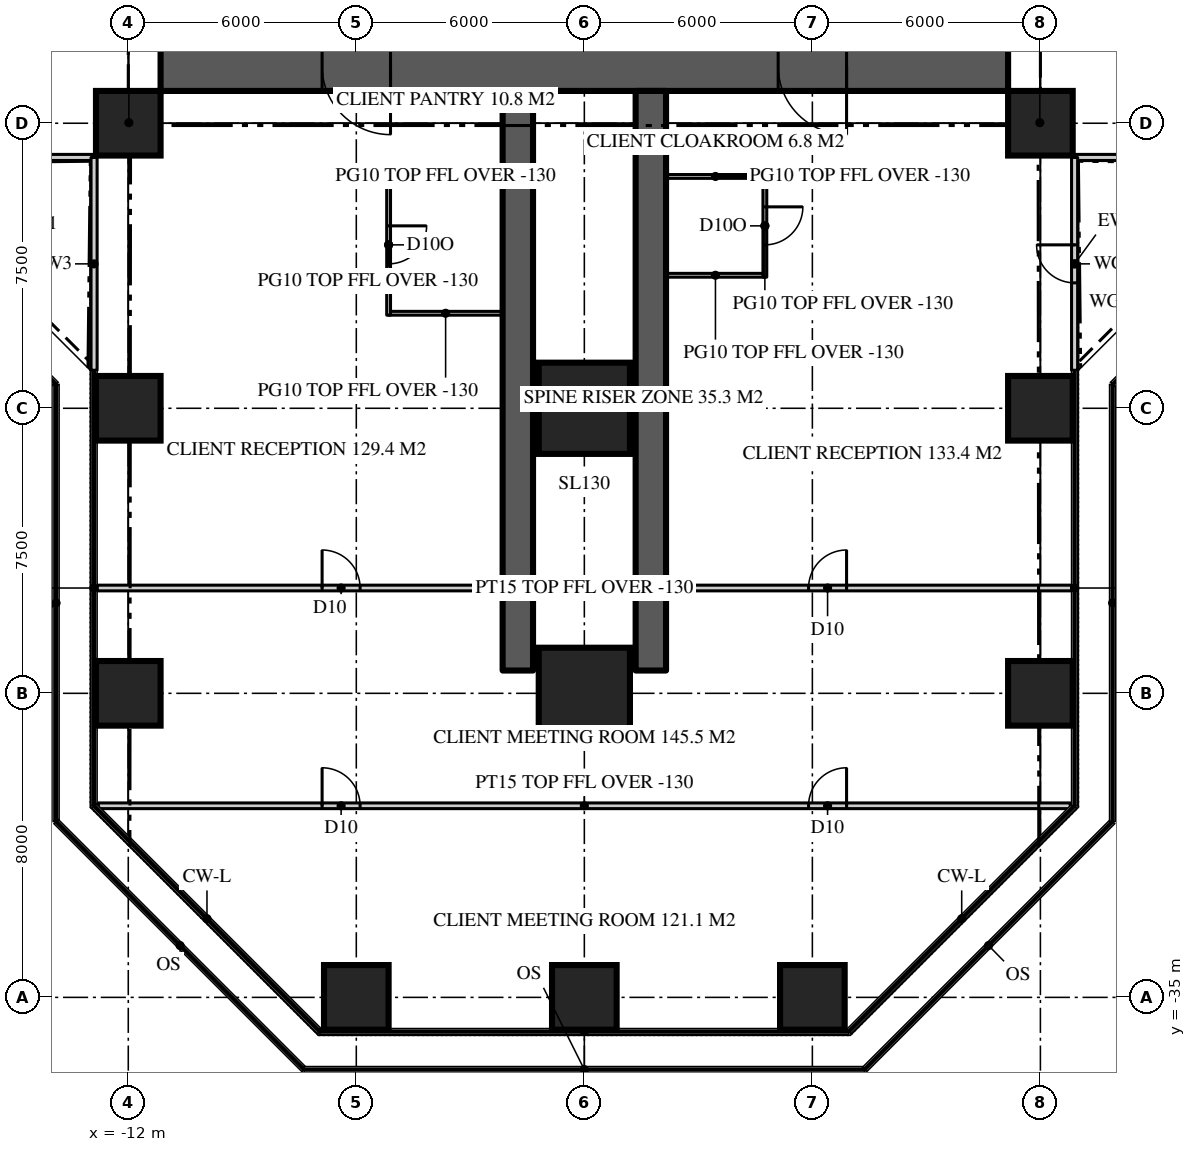
"""IFC4 building model, lengths in metres.
Left out: names, types, materials, properties, quantities, classifications, styles, units other than length and angle.
Written with IfcOpenShell. Run it as: python <this file> out.ifc"""

import sys

from ifc_helpers import new_model, si_unit, direction, frame, frame_2d, origin, origin_2d, place, context, subcontext, project, spatial, rectangle, extrude, element, fill, save


model = new_model("IFC4")
c1 = context("Model", 3, precision=1e-05, world=origin(), true_north=direction((0.0, 1.0)))
c2 = subcontext(c1, "Body", "Model", "MODEL_VIEW")
j1 = project(units=[si_unit("LENGTHUNIT", "METRE"), si_unit("PLANEANGLEUNIT", "RADIAN")], contexts=[c1])
p1 = place(None, origin())
s1 = spatial("IfcSite", under=j1, at=p1, CompositionType="ELEMENT")
p2 = place(p1, origin())
s2 = spatial("IfcBuilding", under=s1, at=p2, CompositionType="ELEMENT")
p3 = place(p2, frame((0.0, 0.0, 94.2)))
s3 = spatial("IfcBuildingStorey", under=s2, at=p3, CompositionType="ELEMENT", Elevation=94.2)
p4 = place(p3, frame((11.15, -10.5, 0.0), z_axis=(0.0, 0.0, 1.0), x_axis=(-1.0, 0.0, 0.0)))
e1 = element("IfcWall", 1, at=p4, inside=s3, PredefinedType="SHEAR", context=c2, shape_type="SweptSolid", body=[
    extrude(rectangle(XDim=22.3, YDim=1.3, at=frame_2d((11.15, 0.0))), origin(), (0.0, 0.0, 1.0), 3.9),
])
p5 = place(p4, frame((16.25, 0.0, 0.0)))
e2 = element("IfcOpeningElement", 2, at=p5, cuts=e1, PredefinedType="OPENING", context=c2, shape_type="SweptSolid", body=[
    extrude(rectangle(XDim=1.8, YDim=2.2, at=frame_2d((0.9, 1.1))), frame((0.0, 0.66, 0.0), z_axis=(0.0, -1.0, 0.0), x_axis=(1.0, 0.0, 0.0)), (0.0, 0.0, 1.0), 1.32),
])
p6 = place(p4, frame((4.25, 0.0, 0.0)))
e3 = element("IfcOpeningElement", 3, at=p6, cuts=e1, PredefinedType="OPENING", context=c2, shape_type="SweptSolid", body=[
    extrude(rectangle(XDim=1.8, YDim=2.2, at=frame_2d((0.9, 1.1))), frame((0.0, 0.66, 0.0), z_axis=(0.0, -1.0, 0.0), x_axis=(1.0, 0.0, 0.0)), (0.0, 0.0, 1.0), 1.32),
])
for number, where, z_axis, x_axis in (
    (4, (-1.75, -11.15, 0.0), (0.0, 0.0, 1.0), (0.0, -1.0, 0.0)),
    (5, (1.75, -11.15, 0.0), (0.0, 0.0, 1.0), (0.0, -1.0, 0.0)),
):
    element("IfcWall", number, at=place(p3, frame(where, z_axis=z_axis, x_axis=x_axis)), inside=s3, PredefinedType="SHEAR", context=c2, shape_type="SweptSolid", body=[
        extrude(rectangle(XDim=15.25, YDim=0.8, at=frame_2d((7.625, 0.0))), origin(), (0.0, 0.0, 1.0), 3.9),
    ])
for number, where, z_axis, x_axis in (
    (6, (-6.0, -35.0, 0.0), (0.0, 0.0, 1.0), (1.0, 0.0, 0.0)),
    (7, (0.0, -35.0, 0.0), (0.0, 0.0, 1.0), (1.0, 0.0, 0.0)),
    (8, (6.0, -35.0, 0.0), (0.0, 0.0, 1.0), (1.0, 0.0, 0.0)),
    (9, (-12.0, -27.0, 0.0), (0.0, 0.0, 1.0), (1.0, 0.0, 0.0)),
):
    element("IfcColumn", number, at=place(p3, frame(where, z_axis=z_axis, x_axis=x_axis)), inside=s3, PredefinedType="COLUMN", context=c2, shape_type="SweptSolid", body=[
        extrude(rectangle(XDim=1.7, YDim=1.7, at=origin_2d()), origin(), (0.0, 0.0, 1.0), 3.9),
    ])
p7 = place(p3, frame((0.0, -27.0, 0.0), z_axis=(0.0, 0.0, 1.0), x_axis=(1.0, 0.0, 0.0)))
e10 = element("IfcColumn", 10, at=p7, inside=s3, PredefinedType="COLUMN", context=c2, shape_type="SweptSolid", body=[
    extrude(rectangle(XDim=2.4, YDim=2.4, at=origin_2d()), origin(), (0.0, 0.0, 1.0), 3.9),
])
for number, where, z_axis, x_axis in (
    (11, (12.0, -27.0, 0.0), (0.0, 0.0, 1.0), (1.0, 0.0, 0.0)),
    (12, (-12.0, -19.5, 0.0), (0.0, 0.0, 1.0), (1.0, 0.0, 0.0)),
):
    element("IfcColumn", number, at=place(p3, frame(where, z_axis=z_axis, x_axis=x_axis)), inside=s3, PredefinedType="COLUMN", context=c2, shape_type="SweptSolid", body=[
        extrude(rectangle(XDim=1.7, YDim=1.7, at=origin_2d()), origin(), (0.0, 0.0, 1.0), 3.9),
    ])
p8 = place(p3, frame((0.0, -19.5, 0.0), z_axis=(0.0, 0.0, 1.0), x_axis=(1.0, 0.0, 0.0)))
e13 = element("IfcColumn", 13, at=p8, inside=s3, PredefinedType="COLUMN", context=c2, shape_type="SweptSolid", body=[
    extrude(rectangle(XDim=2.4, YDim=2.4, at=origin_2d()), origin(), (0.0, 0.0, 1.0), 3.9),
])
for number, where, z_axis, x_axis in (
    (14, (12.0, -19.5, 0.0), (0.0, 0.0, 1.0), (1.0, 0.0, 0.0)),
    (15, (-12.0, -12.0, 0.0), (0.0, 0.0, 1.0), (1.0, 0.0, 0.0)),
    (16, (12.0, -12.0, 0.0), (0.0, 0.0, 1.0), (1.0, 0.0, 0.0)),
):
    element("IfcColumn", number, at=place(p3, frame(where, z_axis=z_axis, x_axis=x_axis)), inside=s3, PredefinedType="COLUMN", context=c2, shape_type="SweptSolid", body=[
        extrude(rectangle(XDim=1.7, YDim=1.7, at=origin_2d()), origin(), (0.0, 0.0, 1.0), 3.9),
    ])
p9 = place(p3, frame((12.9, -12.9, 0.0), z_axis=(0.0, 0.0, 1.0), x_axis=(1.0, 0.0, 0.0)))
e17 = element("IfcWall", 17, at=p9, inside=s3, PredefinedType="SOLIDWALL", context=c2, shape_type="SweptSolid", body=[
    extrude(rectangle(XDim=5.6, YDim=0.16, at=frame_2d((2.8, 0.0))), origin(), (0.0, 0.0, 1.0), 3.77),
])
p10 = place(p3, frame((-18.5, -12.9, 0.0), z_axis=(0.0, 0.0, 1.0), x_axis=(1.0, 0.0, 0.0)))
e18 = element("IfcWall", 18, at=p10, inside=s3, PredefinedType="SOLIDWALL", context=c2, shape_type="SweptSolid", body=[
    extrude(rectangle(XDim=5.6, YDim=0.16, at=frame_2d((2.8, 0.0))), origin(), (0.0, 0.0, 1.0), 3.77),
])
p11 = place(p10, frame((2.3, 0.0, 0.0)))
e19 = element("IfcOpeningElement", 19, at=p11, cuts=e18, PredefinedType="OPENING", context=c2, shape_type="SweptSolid", body=[
    extrude(rectangle(XDim=1.0, YDim=2.2, at=frame_2d((0.5, 1.1))), frame((0.0, 0.09, 0.0), z_axis=(0.0, -1.0, 0.0), x_axis=(1.0, 0.0, 0.0)), (0.0, 0.0, 1.0), 0.18),
])
p12 = place(p3, frame((-12.9, -12.9, 0.0), z_axis=(0.0, 0.0, 1.0), x_axis=(0.0, -1.0, 0.0)))
e20 = element("IfcWall", 20, at=p12, inside=s3, PredefinedType="SOLIDWALL", context=c2, shape_type="SweptSolid", body=[
    extrude(rectangle(XDim=5.6, YDim=0.16, at=frame_2d((2.8, 0.0))), origin(), (0.0, 0.0, 1.0), 3.77),
])
p13 = place(p3, frame((12.9, -18.5, 0.0), z_axis=(0.0, 0.0, 1.0), x_axis=(0.0, 1.0, 0.0)))
e21 = element("IfcWall", 21, at=p13, inside=s3, PredefinedType="SOLIDWALL", context=c2, shape_type="SweptSolid", body=[
    extrude(rectangle(XDim=5.6, YDim=0.16, at=frame_2d((2.8, 0.0))), origin(), (0.0, 0.0, 1.0), 3.77),
])
p14 = place(p13, frame((2.3, 0.0, 0.0)))
e22 = element("IfcOpeningElement", 22, at=p14, cuts=e21, PredefinedType="OPENING", context=c2, shape_type="SweptSolid", body=[
    extrude(rectangle(XDim=1.0, YDim=2.2, at=frame_2d((0.5, 1.1))), frame((0.0, 0.09, 0.0), z_axis=(0.0, -1.0, 0.0), x_axis=(1.0, 0.0, 0.0)), (0.0, 0.0, 1.0), 0.18),
])
p15 = place(p3, frame((-12.82, -24.229, 0.0), z_axis=(0.0, 0.0, 1.0), x_axis=(1.0, 0.0, 0.0)))
e23 = element("IfcWall", 23, at=p15, inside=s3, PredefinedType="PARTITIONING", context=c2, shape_type="SweptSolid", body=[
    extrude(rectangle(XDim=25.64, YDim=0.15, at=frame_2d((12.82, 0.0))), origin(), (0.0, 0.0, 1.0), 3.77),
])
p16 = place(p15, frame((18.72, 0.0, 0.0)))
e24 = element("IfcOpeningElement", 24, at=p16, cuts=e23, PredefinedType="OPENING", context=c2, shape_type="SweptSolid", body=[
    extrude(rectangle(XDim=1.0, YDim=2.2, at=frame_2d((0.5, 1.1))), frame((0.0, 0.085, 0.0), z_axis=(0.0, -1.0, 0.0), x_axis=(1.0, 0.0, 0.0)), (0.0, 0.0, 1.0), 0.17),
])
p17 = place(p15, frame((5.92, 0.0, 0.0)))
e25 = element("IfcOpeningElement", 25, at=p17, cuts=e23, PredefinedType="OPENING", context=c2, shape_type="SweptSolid", body=[
    extrude(rectangle(XDim=1.0, YDim=2.2, at=frame_2d((0.5, 1.1))), frame((0.0, 0.085, 0.0), z_axis=(0.0, -1.0, 0.0), x_axis=(1.0, 0.0, 0.0)), (0.0, 0.0, 1.0), 0.17),
])
p18 = place(p3, frame((-12.786, -29.959, 0.0), z_axis=(0.0, 0.0, 1.0), x_axis=(1.0, 0.0, 0.0)))
e26 = element("IfcWall", 26, at=p18, inside=s3, PredefinedType="PARTITIONING", context=c2, shape_type="SweptSolid", body=[
    extrude(rectangle(XDim=25.573, YDim=0.15, at=frame_2d((12.786, 0.0))), origin(), (0.0, 0.0, 1.0), 3.77),
])
p19 = place(p18, frame((18.687, 0.0, 0.0)))
e27 = element("IfcOpeningElement", 27, at=p19, cuts=e26, PredefinedType="OPENING", context=c2, shape_type="SweptSolid", body=[
    extrude(rectangle(XDim=1.0, YDim=2.2, at=frame_2d((0.5, 1.1))), frame((0.0, 0.085, 0.0), z_axis=(0.0, -1.0, 0.0), x_axis=(1.0, 0.0, 0.0)), (0.0, 0.0, 1.0), 0.17),
])
p20 = place(p18, frame((5.886, 0.0, 0.0)))
e28 = element("IfcOpeningElement", 28, at=p20, cuts=e26, PredefinedType="OPENING", context=c2, shape_type="SweptSolid", body=[
    extrude(rectangle(XDim=1.0, YDim=2.2, at=frame_2d((0.5, 1.1))), frame((0.0, 0.085, 0.0), z_axis=(0.0, -1.0, 0.0), x_axis=(1.0, 0.0, 0.0)), (0.0, 0.0, 1.0), 0.17),
])
for number, where, z_axis, x_axis in (
    (29, (2.15, -13.4, 0.0), (0.0, 0.0, 1.0), (1.0, 0.0, 0.0)),
    (30, (2.15, -16.0, 0.0), (0.0, 0.0, 1.0), (1.0, 0.0, 0.0)),
):
    element("IfcWall", number, at=place(p3, frame(where, z_axis=z_axis, x_axis=x_axis)), inside=s3, PredefinedType="PARTITIONING", context=c2, shape_type="SweptSolid", body=[
        extrude(rectangle(XDim=2.6, YDim=0.1, at=frame_2d((1.3, 0.0))), origin(), (0.0, 0.0, 1.0), 3.77),
    ])
p21 = place(p3, frame((4.75, -13.35, 0.0), z_axis=(0.0, 0.0, 1.0), x_axis=(0.0, -1.0, 0.0)))
e31 = element("IfcWall", 31, at=p21, inside=s3, PredefinedType="PARTITIONING", context=c2, shape_type="SweptSolid", body=[
    extrude(rectangle(XDim=2.7, YDim=0.1, at=frame_2d((1.35, 0.0))), origin(), (0.0, 0.0, 1.0), 3.77),
])
p22 = place(p21, frame((0.85, 0.0, 0.0)))
e32 = element("IfcOpeningElement", 32, at=p22, cuts=e31, PredefinedType="OPENING", context=c2, shape_type="SweptSolid", body=[
    extrude(rectangle(XDim=1.0, YDim=2.2, at=frame_2d((0.5, 1.1))), frame((0.0, 0.06, 0.0), z_axis=(0.0, -1.0, 0.0), x_axis=(1.0, 0.0, 0.0)), (0.0, 0.0, 1.0), 0.12),
])
for number, where, z_axis, x_axis in (
    (33, (-2.15, -13.4, 0.0), (0.0, 0.0, 1.0), (-1.0, 0.0, 0.0)),
    (34, (-2.15, -17.0, 0.0), (0.0, 0.0, 1.0), (-1.0, 0.0, 0.0)),
):
    element("IfcWall", number, at=place(p3, frame(where, z_axis=z_axis, x_axis=x_axis)), inside=s3, PredefinedType="PARTITIONING", context=c2, shape_type="SweptSolid", body=[
        extrude(rectangle(XDim=3.0, YDim=0.1, at=frame_2d((1.5, 0.0))), origin(), (0.0, 0.0, 1.0), 3.77),
    ])
p23 = place(p3, frame((-5.15, -13.35, 0.0), z_axis=(0.0, 0.0, 1.0), x_axis=(0.0, -1.0, 0.0)))
e35 = element("IfcWall", 35, at=p23, inside=s3, PredefinedType="PARTITIONING", context=c2, shape_type="SweptSolid", body=[
    extrude(rectangle(XDim=3.7, YDim=0.1, at=frame_2d((1.85, 0.0))), origin(), (0.0, 0.0, 1.0), 3.77),
])
p24 = place(p23, frame((1.35, 0.0, 0.0)))
e36 = element("IfcOpeningElement", 36, at=p24, cuts=e35, PredefinedType="OPENING", context=c2, shape_type="SweptSolid", body=[
    extrude(rectangle(XDim=1.0, YDim=2.2, at=frame_2d((0.5, 1.1))), frame((0.0, 0.06, 0.0), z_axis=(0.0, -1.0, 0.0), x_axis=(1.0, 0.0, 0.0)), (0.0, 0.0, 1.0), 0.12),
])
for number, where, z_axis, x_axis in (
    (37, (-11.15, -11.15, 0.0), (0.0, 0.0, 1.0), (-0.707, -0.707, 0.0)),
    (38, (11.15, -11.15, 0.0), (0.0, 0.0, 1.0), (0.707, -0.707, 0.0)),
):
    element("IfcWall", number, at=place(p3, frame(where, z_axis=z_axis, x_axis=x_axis)), inside=s3, PredefinedType="PARTITIONING", context=c2, shape_type="SweptSolid", body=[
        extrude(rectangle(XDim=2.362, YDim=0.15, at=frame_2d((1.181, 0.0))), origin(), (0.0, 0.0, 1.0), 3.22),
    ])
p25 = place(p14, origin())
e39 = element("IfcDoor", 39, at=p25, inside=s3, OperationType="SINGLE_SWING_RIGHT", PredefinedType="DOOR", context=c2, shape_type="SweptSolid", body=[
    extrude(rectangle(XDim=1.0, YDim=2.2, at=frame_2d((0.5, 1.1))), frame((0.0, 0.025, 0.0), z_axis=(0.0, -1.0, 0.0), x_axis=(1.0, 0.0, 0.0)), (0.0, 0.0, 1.0), 0.05),
])
fill(e22, e39)
p26 = place(p5, origin())
e40 = element("IfcDoor", 40, at=p26, inside=s3, OperationType="DOUBLE_DOOR_DOUBLE_SWING", PredefinedType="DOOR", context=c2, shape_type="SweptSolid", body=[
    extrude(rectangle(XDim=1.8, YDim=2.2, at=frame_2d((0.9, 1.1))), frame((0.0, 0.025, 0.0), z_axis=(0.0, -1.0, 0.0), x_axis=(1.0, 0.0, 0.0)), (0.0, 0.0, 1.0), 0.05),
])
fill(e2, e40)
p27 = place(p6, origin())
e41 = element("IfcDoor", 41, at=p27, inside=s3, OperationType="DOUBLE_DOOR_DOUBLE_SWING", PredefinedType="DOOR", context=c2, shape_type="SweptSolid", body=[
    extrude(rectangle(XDim=1.8, YDim=2.2, at=frame_2d((0.9, 1.1))), frame((0.0, 0.025, 0.0), z_axis=(0.0, -1.0, 0.0), x_axis=(1.0, 0.0, 0.0)), (0.0, 0.0, 1.0), 0.05),
])
fill(e3, e41)
p28 = place(p16, origin())
e42 = element("IfcDoor", 42, at=p28, inside=s3, OperationType="SINGLE_SWING_RIGHT", PredefinedType="DOOR", context=c2, shape_type="SweptSolid", body=[
    extrude(rectangle(XDim=1.0, YDim=2.2, at=frame_2d((0.5, 1.1))), frame((0.0, 0.025, 0.0), z_axis=(0.0, -1.0, 0.0), x_axis=(1.0, 0.0, 0.0)), (0.0, 0.0, 1.0), 0.05),
])
fill(e24, e42)
p29 = place(p17, origin())
e43 = element("IfcDoor", 43, at=p29, inside=s3, OperationType="SINGLE_SWING_LEFT", PredefinedType="DOOR", context=c2, shape_type="SweptSolid", body=[
    extrude(rectangle(XDim=1.0, YDim=2.2, at=frame_2d((0.5, 1.1))), frame((0.0, 0.025, 0.0), z_axis=(0.0, -1.0, 0.0), x_axis=(1.0, 0.0, 0.0)), (0.0, 0.0, 1.0), 0.05),
])
fill(e25, e43)
p30 = place(p19, origin())
e44 = element("IfcDoor", 44, at=p30, inside=s3, OperationType="SINGLE_SWING_RIGHT", PredefinedType="DOOR", context=c2, shape_type="SweptSolid", body=[
    extrude(rectangle(XDim=1.0, YDim=2.2, at=frame_2d((0.5, 1.1))), frame((0.0, 0.025, 0.0), z_axis=(0.0, -1.0, 0.0), x_axis=(1.0, 0.0, 0.0)), (0.0, 0.0, 1.0), 0.05),
])
fill(e27, e44)
p31 = place(p20, origin())
e45 = element("IfcDoor", 45, at=p31, inside=s3, OperationType="SINGLE_SWING_LEFT", PredefinedType="DOOR", context=c2, shape_type="SweptSolid", body=[
    extrude(rectangle(XDim=1.0, YDim=2.2, at=frame_2d((0.5, 1.1))), frame((0.0, 0.025, 0.0), z_axis=(0.0, -1.0, 0.0), x_axis=(1.0, 0.0, 0.0)), (0.0, 0.0, 1.0), 0.05),
])
fill(e28, e45)
p32 = place(p22, origin())
e46 = element("IfcDoor", 46, at=p32, inside=s3, OperationType="SINGLE_SWING_LEFT", PredefinedType="DOOR", context=c2, shape_type="SweptSolid", body=[
    extrude(rectangle(XDim=1.0, YDim=2.2, at=frame_2d((0.5, 1.1))), frame((0.0, 0.025, 0.0), z_axis=(0.0, -1.0, 0.0), x_axis=(1.0, 0.0, 0.0)), (0.0, 0.0, 1.0), 0.05),
])
fill(e32, e46)
p33 = place(p24, origin())
e47 = element("IfcDoor", 47, at=p33, inside=s3, OperationType="SINGLE_SWING_LEFT", PredefinedType="DOOR", context=c2, shape_type="SweptSolid", body=[
    extrude(rectangle(XDim=1.0, YDim=2.2, at=frame_2d((0.5, 1.1))), frame((0.0, 0.025, 0.0), z_axis=(0.0, -1.0, 0.0), x_axis=(1.0, 0.0, 0.0)), (0.0, 0.0, 1.0), 0.05),
])
fill(e36, e47)
save(model, sys.argv[1])
